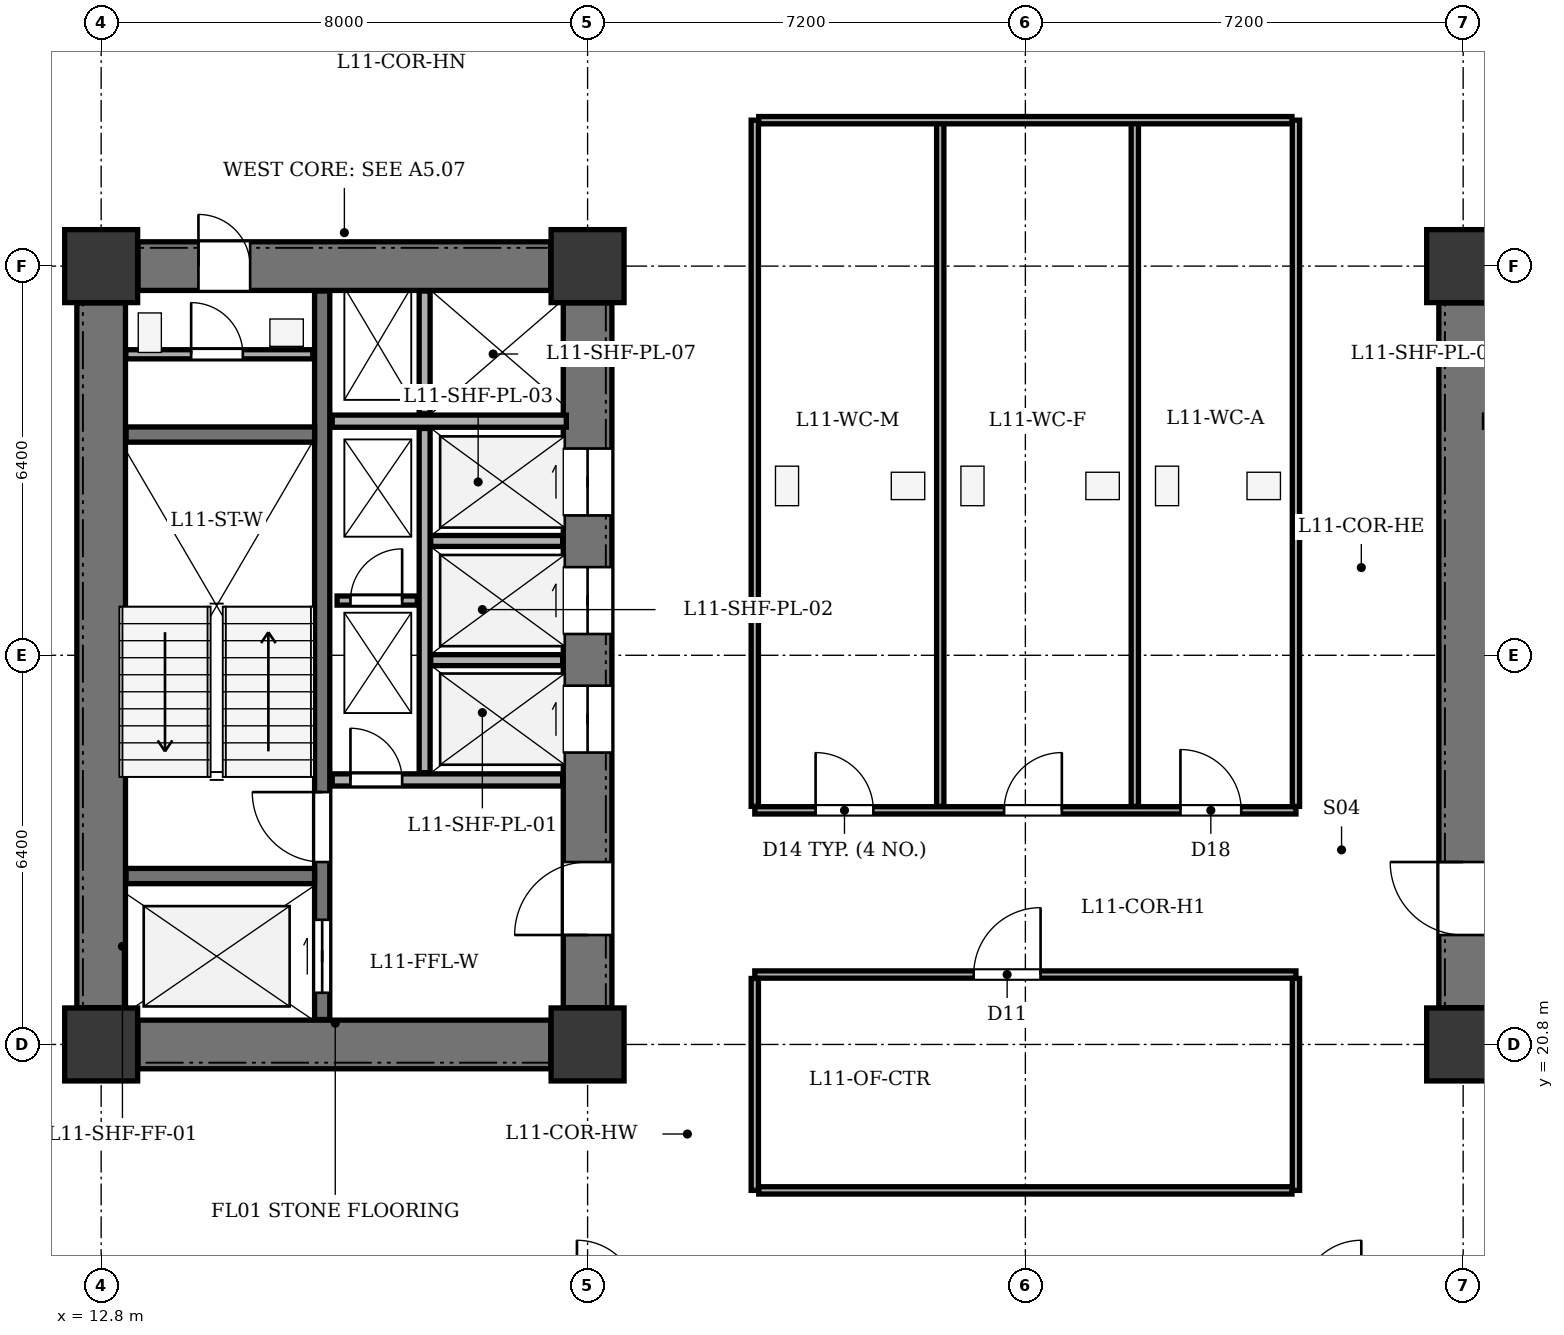
"""IFC4 building model, lengths in metres.
Left out: names, types, materials, properties, quantities, classifications, styles, units other than length and angle.
Written with IfcOpenShell. Run it as: python <this file> out.ifc"""

import sys

from ifc_helpers import new_model, si_unit, direction, frame, frame_2d, origin, origin_2d, place, context, subcontext, project, spatial, rectangle, extrude, element, fill, save


model = new_model("IFC4")
c1 = context("Model", 3, precision=1e-05, world=origin(), true_north=direction((0.0, 1.0)))
c2 = subcontext(c1, "Body", "Model", "MODEL_VIEW")
j1 = project(units=[si_unit("LENGTHUNIT", "METRE"), si_unit("PLANEANGLEUNIT", "RADIAN")], contexts=[c1])
p1 = place(None, origin())
s1 = spatial("IfcSite", under=j1, at=p1, CompositionType="ELEMENT")
p2 = place(p1, origin())
s2 = spatial("IfcBuilding", under=s1, at=p2, CompositionType="ELEMENT")
p3 = place(p2, frame((0.0, 0.0, 47.7)))
s3 = spatial("IfcBuildingStorey", under=s2, at=p3, CompositionType="ELEMENT", Elevation=47.7)
for number, where, z_axis, x_axis in (
    (1, (12.8, 20.8, 0.0), (0.0, 0.0, 1.0), (1.0, 0.0, 0.0)),
    (2, (20.8, 20.8, 0.0), (0.0, 0.0, 1.0), (1.0, 0.0, 0.0)),
    (3, (12.8, 33.6, 0.0), (0.0, 0.0, 1.0), (1.0, 0.0, 0.0)),
    (4, (20.8, 33.6, 0.0), (0.0, 0.0, 1.0), (1.0, 0.0, 0.0)),
    (5, (35.2, 20.8, 0.0), (0.0, 0.0, 1.0), (1.0, 0.0, 0.0)),
    (6, (35.2, 33.6, 0.0), (0.0, 0.0, 1.0), (1.0, 0.0, 0.0)),
):
    element("IfcColumn", number, at=place(p3, frame(where, z_axis=z_axis, x_axis=x_axis)), inside=s3, PredefinedType="COLUMN", context=c2, shape_type="SweptSolid", body=[
        extrude(rectangle(XDim=1.2, YDim=1.2, at=origin_2d()), origin(), (0.0, 0.0, 1.0), 3.9),
    ])
p4 = place(p3, frame((12.8, 21.405, 0.0), z_axis=(0.0, 0.0, 1.0), x_axis=(0.0, 1.0, 0.0)))
e7 = element("IfcWall", 7, at=p4, inside=s3, PredefinedType="SHEAR", context=c2, shape_type="SweptSolid", body=[
    extrude(rectangle(XDim=11.59, YDim=0.8, at=frame_2d((5.795, 0.0))), origin(), (0.0, 0.0, 1.0), 3.6),
])
p5 = place(p3, frame((13.405, 20.8, 0.0), z_axis=(0.0, 0.0, 1.0), x_axis=(1.0, 0.0, 0.0)))
e8 = element("IfcWall", 8, at=p5, inside=s3, PredefinedType="SHEAR", context=c2, shape_type="SweptSolid", body=[
    extrude(rectangle(XDim=6.79, YDim=0.8, at=frame_2d((3.395, 0.0))), origin(), (0.0, 0.0, 1.0), 3.6),
])
p6 = place(p3, frame((13.405, 33.6, 0.0), z_axis=(0.0, 0.0, 1.0), x_axis=(1.0, 0.0, 0.0)))
e9 = element("IfcWall", 9, at=p6, inside=s3, PredefinedType="SHEAR", context=c2, shape_type="SweptSolid", body=[
    extrude(rectangle(XDim=6.79, YDim=0.8, at=frame_2d((3.395, 0.0))), origin(), (0.0, 0.0, 1.0), 3.6),
])
p7 = place(p6, frame((0.995, 0.0, 0.0)))
e10 = element("IfcOpeningElement", 10, at=p7, cuts=e9, PredefinedType="OPENING", context=c2, shape_type="SweptSolid", body=[
    extrude(rectangle(XDim=0.85, YDim=2.02, at=frame_2d((0.425, 1.01))), frame((0.0, 0.41, 0.0), z_axis=(0.0, -1.0, 0.0), x_axis=(1.0, 0.0, 0.0)), (0.0, 0.0, 1.0), 0.82),
])
p8 = place(p3, frame((20.8, 21.405, 0.0), z_axis=(0.0, 0.0, 1.0), x_axis=(0.0, 1.0, 0.0)))
e11 = element("IfcWall", 11, at=p8, inside=s3, PredefinedType="SHEAR", context=c2, shape_type="SweptSolid", body=[
    extrude(rectangle(XDim=11.59, YDim=0.8, at=frame_2d((5.795, 0.0))), origin(), (0.0, 0.0, 1.0), 3.6),
])
p9 = place(p8, frame((1.195, 0.0, 0.0)))
e12 = element("IfcOpeningElement", 12, at=p9, cuts=e11, PredefinedType="OPENING", context=c2, shape_type="SweptSolid", body=[
    extrude(rectangle(XDim=1.2, YDim=2.15, at=frame_2d((0.6, 1.075))), frame((0.0, 0.41, 0.0), z_axis=(0.0, -1.0, 0.0), x_axis=(1.0, 0.0, 0.0)), (0.0, 0.0, 1.0), 0.82),
])
p10 = place(p8, frame((4.195, 0.0, 0.0)))
e13 = element("IfcOpeningElement", 13, at=p10, cuts=e11, PredefinedType="OPENING", context=c2, shape_type="SweptSolid", body=[
    extrude(rectangle(XDim=1.1, YDim=2.1, at=frame_2d((0.55, 1.05))), frame((0.0, 0.41, 0.0), z_axis=(0.0, -1.0, 0.0), x_axis=(1.0, 0.0, 0.0)), (0.0, 0.0, 1.0), 0.82),
])
p11 = place(p8, frame((6.145, 0.0, 0.0)))
e14 = element("IfcOpeningElement", 14, at=p11, cuts=e11, PredefinedType="OPENING", context=c2, shape_type="SweptSolid", body=[
    extrude(rectangle(XDim=1.1, YDim=2.1, at=frame_2d((0.55, 1.05))), frame((0.0, 0.41, 0.0), z_axis=(0.0, -1.0, 0.0), x_axis=(1.0, 0.0, 0.0)), (0.0, 0.0, 1.0), 0.82),
])
p12 = place(p8, frame((8.095, 0.0, 0.0)))
e15 = element("IfcOpeningElement", 15, at=p12, cuts=e11, PredefinedType="OPENING", context=c2, shape_type="SweptSolid", body=[
    extrude(rectangle(XDim=1.1, YDim=2.1, at=frame_2d((0.55, 1.05))), frame((0.0, 0.41, 0.0), z_axis=(0.0, -1.0, 0.0), x_axis=(1.0, 0.0, 0.0)), (0.0, 0.0, 1.0), 0.82),
])
p13 = place(p3, frame((16.435, 21.21, 0.0), z_axis=(0.0, 0.0, 1.0), x_axis=(0.0, 1.0, 0.0)))
e16 = element("IfcWall", 16, at=p13, inside=s3, PredefinedType="SHEAR", context=c2, shape_type="SweptSolid", body=[
    extrude(rectangle(XDim=11.98, YDim=0.25, at=frame_2d((5.99, 0.0))), origin(), (0.0, 0.0, 1.0), 3.6),
])
p14 = place(p13, frame((0.44, 0.0, 0.0)))
e17 = element("IfcOpeningElement", 17, at=p14, cuts=e16, PredefinedType="OPENING", context=c2, shape_type="SweptSolid", body=[
    extrude(rectangle(XDim=1.2, YDim=2.15, at=frame_2d((0.6, 1.075))), frame((0.0, 0.135, 0.0), z_axis=(0.0, -1.0, 0.0), x_axis=(1.0, 0.0, 0.0)), (0.0, 0.0, 1.0), 0.27),
])
p15 = place(p13, frame((2.59, 0.0, 0.0)))
e18 = element("IfcOpeningElement", 18, at=p15, cuts=e16, PredefinedType="OPENING", context=c2, shape_type="SweptSolid", body=[
    extrude(rectangle(XDim=1.15, YDim=2.15, at=frame_2d((0.575, 1.075))), frame((0.0, 0.135, 0.0), z_axis=(0.0, -1.0, 0.0), x_axis=(1.0, 0.0, 0.0)), (0.0, 0.0, 1.0), 0.27),
])
for number, where, z_axis, x_axis in (
    (19, (13.21, 23.57, 0.0), (0.0, 0.0, 1.0), (1.0, 0.0, 0.0)),
    (20, (13.21, 30.83, 0.0), (0.0, 0.0, 1.0), (1.0, 0.0, 0.0)),
):
    element("IfcWall", number, at=place(p3, frame(where, z_axis=z_axis, x_axis=x_axis)), inside=s3, PredefinedType="SHEAR", context=c2, shape_type="SweptSolid", body=[
        extrude(rectangle(XDim=3.1, YDim=0.25, at=frame_2d((1.55, 0.0))), origin(), (0.0, 0.0, 1.0), 3.6),
    ])
p16 = place(p3, frame((16.6, 25.15, 0.0), z_axis=(0.0, 0.0, 1.0), x_axis=(1.0, 0.0, 0.0)))
e21 = element("IfcWall", 21, at=p16, inside=s3, PredefinedType="SOLIDWALL", context=c2, shape_type="SweptSolid", body=[
    extrude(rectangle(XDim=3.79, YDim=0.2, at=frame_2d((1.895, 0.0))), origin(), (0.0, 0.0, 1.0), 3.6),
])
p17 = place(p16, frame((0.3, 0.0, 0.0)))
e22 = element("IfcOpeningElement", 22, at=p17, cuts=e21, PredefinedType="OPENING", context=c2, shape_type="SweptSolid", body=[
    extrude(rectangle(XDim=0.85, YDim=2.02, at=frame_2d((0.425, 1.01))), frame((0.0, 0.11, 0.0), z_axis=(0.0, -1.0, 0.0), x_axis=(1.0, 0.0, 0.0)), (0.0, 0.0, 1.0), 0.22),
])
p18 = place(p3, frame((16.6, 31.05, 0.0), z_axis=(0.0, 0.0, 1.0), x_axis=(1.0, 0.0, 0.0)))
e23 = element("IfcWall", 23, at=p18, inside=s3, PredefinedType="SOLIDWALL", context=c2, shape_type="SweptSolid", body=[
    extrude(rectangle(XDim=3.85, YDim=0.2, at=frame_2d((1.925, 0.0))), origin(), (0.0, 0.0, 1.0), 3.6),
])
p19 = place(p3, frame((18.12, 25.27, 0.0), z_axis=(0.0, 0.0, 1.0), x_axis=(0.0, 1.0, 0.0)))
e24 = element("IfcWall", 24, at=p19, inside=s3, PredefinedType="PARTITIONING", context=c2, shape_type="SweptSolid", body=[
    extrude(rectangle(XDim=5.66, YDim=0.18, at=frame_2d((2.83, 0.0))), origin(), (0.0, 0.0, 1.0), 3.6),
])
p20 = place(p3, frame((18.12, 31.17, 0.0), z_axis=(0.0, 0.0, 1.0), x_axis=(0.0, 1.0, 0.0)))
e25 = element("IfcWall", 25, at=p20, inside=s3, PredefinedType="PARTITIONING", context=c2, shape_type="SweptSolid", body=[
    extrude(rectangle(XDim=2.02, YDim=0.18, at=frame_2d((1.01, 0.0))), origin(), (0.0, 0.0, 1.0), 3.6),
])
for number, where, z_axis, x_axis in (
    (26, (18.22, 27.12, 0.0), (0.0, 0.0, 1.0), (1.0, 0.0, 0.0)),
    (27, (18.22, 29.08, 0.0), (0.0, 0.0, 1.0), (1.0, 0.0, 0.0)),
):
    element("IfcWall", number, at=place(p3, frame(where, z_axis=z_axis, x_axis=x_axis)), inside=s3, PredefinedType="PARTITIONING", context=c2, shape_type="SweptSolid", body=[
        extrude(rectangle(XDim=2.17, YDim=0.18, at=frame_2d((1.085, 0.0))), origin(), (0.0, 0.0, 1.0), 3.6),
    ])
p21 = place(p3, frame((35.2, 21.405, 0.0), z_axis=(0.0, 0.0, 1.0), x_axis=(0.0, 1.0, 0.0)))
e28 = element("IfcWall", 28, at=p21, inside=s3, PredefinedType="SHEAR", context=c2, shape_type="SweptSolid", body=[
    extrude(rectangle(XDim=11.59, YDim=0.8, at=frame_2d((5.795, 0.0))), origin(), (0.0, 0.0, 1.0), 3.6),
])
p22 = place(p21, frame((1.195, 0.0, 0.0)))
e29 = element("IfcOpeningElement", 29, at=p22, cuts=e28, PredefinedType="OPENING", context=c2, shape_type="SweptSolid", body=[
    extrude(rectangle(XDim=1.2, YDim=2.15, at=frame_2d((0.6, 1.075))), frame((0.0, 0.41, 0.0), z_axis=(0.0, -1.0, 0.0), x_axis=(1.0, 0.0, 0.0)), (0.0, 0.0, 1.0), 0.82),
])
p23 = place(p3, frame((13.205, 32.15, 0.0), z_axis=(0.0, 0.0, 1.0), x_axis=(1.0, 0.0, 0.0)))
e30 = element("IfcWall", 30, at=p23, inside=s3, PredefinedType="PARTITIONING", context=c2, shape_type="SweptSolid", body=[
    extrude(rectangle(XDim=3.075, YDim=0.15, at=frame_2d((1.538, 0.0))), origin(), (0.0, 0.0, 1.0), 3.6),
])
p24 = place(p23, frame((1.075, 0.0, 0.0)))
e31 = element("IfcOpeningElement", 31, at=p24, cuts=e30, PredefinedType="OPENING", context=c2, shape_type="SweptSolid", body=[
    extrude(rectangle(XDim=0.85, YDim=2.02, at=frame_2d((0.425, 1.01))), frame((0.0, 0.085, 0.0), z_axis=(0.0, -1.0, 0.0), x_axis=(1.0, 0.0, 0.0)), (0.0, 0.0, 1.0), 0.17),
])
p25 = place(p3, frame((16.68, 28.1, 0.0), z_axis=(0.0, 0.0, 1.0), x_axis=(1.0, 0.0, 0.0)))
e32 = element("IfcWall", 32, at=p25, inside=s3, PredefinedType="PARTITIONING", context=c2, shape_type="SweptSolid", body=[
    extrude(rectangle(XDim=1.32, YDim=0.15, at=frame_2d((0.66, 0.0))), origin(), (0.0, 0.0, 1.0), 3.6),
])
p26 = place(p25, frame((0.22, 0.0, 0.0)))
e33 = element("IfcOpeningElement", 33, at=p26, cuts=e32, PredefinedType="OPENING", context=c2, shape_type="SweptSolid", body=[
    extrude(rectangle(XDim=0.85, YDim=2.02, at=frame_2d((0.425, 1.01))), frame((0.0, 0.085, 0.0), z_axis=(0.0, -1.0, 0.0), x_axis=(1.0, 0.0, 0.0)), (0.0, 0.0, 1.0), 0.17),
])
p27 = place(p3, frame((23.55, 24.65, 0.0), z_axis=(0.0, 0.0, 1.0), x_axis=(1.0, 0.0, 0.0)))
e34 = element("IfcWall", 34, at=p27, inside=s3, PredefinedType="PARTITIONING", context=c2, shape_type="SweptSolid", body=[
    extrude(rectangle(XDim=8.9, YDim=0.12, at=frame_2d((4.45, 0.0))), origin(), (0.0, 0.0, 1.0), 3.135),
])
p28 = place(p27, frame((1.0, 0.0, 0.0)))
e35 = element("IfcOpeningElement", 35, at=p28, cuts=e34, PredefinedType="OPENING", context=c2, shape_type="SweptSolid", body=[
    extrude(rectangle(XDim=0.95, YDim=2.1, at=frame_2d((0.475, 1.05))), frame((0.0, 0.07, 0.0), z_axis=(0.0, -1.0, 0.0), x_axis=(1.0, 0.0, 0.0)), (0.0, 0.0, 1.0), 0.14),
])
p29 = place(p27, frame((4.1, 0.0, 0.0)))
e36 = element("IfcOpeningElement", 36, at=p29, cuts=e34, PredefinedType="OPENING", context=c2, shape_type="SweptSolid", body=[
    extrude(rectangle(XDim=0.95, YDim=2.1, at=frame_2d((0.475, 1.05))), frame((0.0, 0.07, 0.0), z_axis=(0.0, -1.0, 0.0), x_axis=(1.0, 0.0, 0.0)), (0.0, 0.0, 1.0), 0.14),
])
p30 = place(p27, frame((7.0, 0.0, 0.0)))
e37 = element("IfcOpeningElement", 37, at=p30, cuts=e34, PredefinedType="OPENING", context=c2, shape_type="SweptSolid", body=[
    extrude(rectangle(XDim=1.0, YDim=2.1, at=frame_2d((0.5, 1.05))), frame((0.0, 0.07, 0.0), z_axis=(0.0, -1.0, 0.0), x_axis=(1.0, 0.0, 0.0)), (0.0, 0.0, 1.0), 0.14),
])
for number, where, z_axis, x_axis in (
    (38, (23.55, 24.715, 0.0), (0.0, 0.0, 1.0), (0.0, 1.0, 0.0)),
    (39, (32.45, 24.715, 0.0), (0.0, 0.0, 1.0), (0.0, 1.0, 0.0)),
    (40, (26.6, 24.715, 0.0), (0.0, 0.0, 1.0), (0.0, 1.0, 0.0)),
):
    element("IfcWall", number, at=place(p3, frame(where, z_axis=z_axis, x_axis=x_axis)), inside=s3, PredefinedType="PARTITIONING", context=c2, shape_type="SweptSolid", body=[
        extrude(rectangle(XDim=11.285, YDim=0.12, at=frame_2d((5.643, 0.0))), origin(), (0.0, 0.0, 1.0), 3.6),
    ])
p31 = place(p3, frame((29.8, 24.715, 0.0), z_axis=(0.0, 0.0, 1.0), x_axis=(0.0, 1.0, 0.0)))
e41 = element("IfcWall", 41, at=p31, inside=s3, PredefinedType="PARTITIONING", context=c2, shape_type="SweptSolid", body=[
    extrude(rectangle(XDim=11.285, YDim=0.12, at=frame_2d((5.643, 0.0))), origin(), (0.0, 0.0, 1.0), 3.135),
])
p32 = place(p3, frame((23.615, 36.0, 0.0), z_axis=(0.0, 0.0, 1.0), x_axis=(1.0, 0.0, 0.0)))
e42 = element("IfcWall", 42, at=p32, inside=s3, PredefinedType="PARTITIONING", context=c2, shape_type="SweptSolid", body=[
    extrude(rectangle(XDim=8.77, YDim=0.12, at=frame_2d((4.385, 0.0))), origin(), (0.0, 0.0, 1.0), 3.6),
])
p33 = place(p3, frame((23.55, 21.95, 0.0), z_axis=(0.0, 0.0, 1.0), x_axis=(1.0, 0.0, 0.0)))
e43 = element("IfcWall", 43, at=p33, inside=s3, PredefinedType="PARTITIONING", context=c2, shape_type="SweptSolid", body=[
    extrude(rectangle(XDim=8.9, YDim=0.12, at=frame_2d((4.45, 0.0))), origin(), (0.0, 0.0, 1.0), 3.135),
])
p34 = place(p33, frame((3.6, 0.0, 0.0)))
e44 = element("IfcOpeningElement", 44, at=p34, cuts=e43, PredefinedType="OPENING", context=c2, shape_type="SweptSolid", body=[
    extrude(rectangle(XDim=1.1, YDim=2.15, at=frame_2d((0.55, 1.075))), frame((0.0, 0.07, 0.0), z_axis=(0.0, -1.0, 0.0), x_axis=(1.0, 0.0, 0.0)), (0.0, 0.0, 1.0), 0.14),
])
for number, where, z_axis, x_axis in (
    (45, (23.55, 18.4, 0.0), (0.0, 0.0, 1.0), (0.0, 1.0, 0.0)),
    (46, (32.45, 18.4, 0.0), (0.0, 0.0, 1.0), (0.0, 1.0, 0.0)),
):
    element("IfcWall", number, at=place(p3, frame(where, z_axis=z_axis, x_axis=x_axis)), inside=s3, PredefinedType="PARTITIONING", context=c2, shape_type="SweptSolid", body=[
        extrude(rectangle(XDim=3.485, YDim=0.12, at=frame_2d((1.743, 0.0))), origin(), (0.0, 0.0, 1.0), 3.6),
    ])
p35 = place(p3, frame((23.615, 18.4, 0.0), z_axis=(0.0, 0.0, 1.0), x_axis=(1.0, 0.0, 0.0)))
e47 = element("IfcWall", 47, at=p35, inside=s3, PredefinedType="PARTITIONING", context=c2, shape_type="SweptSolid", body=[
    extrude(rectangle(XDim=8.77, YDim=0.12, at=frame_2d((4.385, 0.0))), origin(), (0.0, 0.0, 1.0), 3.6),
])
p36 = place(p7, origin())
e48 = element("IfcDoor", 48, at=p36, inside=s3, OperationType="SINGLE_SWING_LEFT", PredefinedType="DOOR", context=c2, shape_type="SweptSolid", body=[
    extrude(rectangle(XDim=0.85, YDim=2.02, at=frame_2d((0.425, 1.01))), frame((0.0, 0.025, 0.0), z_axis=(0.0, -1.0, 0.0), x_axis=(1.0, 0.0, 0.0)), (0.0, 0.0, 1.0), 0.05),
])
fill(e10, e48)
p37 = place(p9, origin())
e49 = element("IfcDoor", 49, at=p37, inside=s3, OperationType="SINGLE_SWING_LEFT", PredefinedType="DOOR", context=c2, shape_type="SweptSolid", body=[
    extrude(rectangle(XDim=1.2, YDim=2.15, at=frame_2d((0.6, 1.075))), frame((0.0, 0.025, 0.0), z_axis=(0.0, -1.0, 0.0), x_axis=(1.0, 0.0, 0.0)), (0.0, 0.0, 1.0), 0.05),
])
fill(e12, e49)
p38 = place(p10, origin())
e50 = element("IfcDoor", 50, at=p38, inside=s3, OperationType="DOUBLE_DOOR_SLIDING", PredefinedType="DOOR", context=c2, shape_type="SweptSolid", body=[
    extrude(rectangle(XDim=1.1, YDim=2.1, at=frame_2d((0.55, 1.05))), frame((0.0, 0.025, 0.0), z_axis=(0.0, -1.0, 0.0), x_axis=(1.0, 0.0, 0.0)), (0.0, 0.0, 1.0), 0.05),
])
fill(e13, e50)
p39 = place(p11, origin())
e51 = element("IfcDoor", 51, at=p39, inside=s3, OperationType="DOUBLE_DOOR_SLIDING", PredefinedType="DOOR", context=c2, shape_type="SweptSolid", body=[
    extrude(rectangle(XDim=1.1, YDim=2.1, at=frame_2d((0.55, 1.05))), frame((0.0, 0.025, 0.0), z_axis=(0.0, -1.0, 0.0), x_axis=(1.0, 0.0, 0.0)), (0.0, 0.0, 1.0), 0.05),
])
fill(e14, e51)
p40 = place(p12, origin())
e52 = element("IfcDoor", 52, at=p40, inside=s3, OperationType="DOUBLE_DOOR_SLIDING", PredefinedType="DOOR", context=c2, shape_type="SweptSolid", body=[
    extrude(rectangle(XDim=1.1, YDim=2.1, at=frame_2d((0.55, 1.05))), frame((0.0, 0.025, 0.0), z_axis=(0.0, -1.0, 0.0), x_axis=(1.0, 0.0, 0.0)), (0.0, 0.0, 1.0), 0.05),
])
fill(e15, e52)
p41 = place(p14, origin())
e53 = element("IfcDoor", 53, at=p41, inside=s3, OperationType="DOUBLE_DOOR_SLIDING", PredefinedType="DOOR", context=c2, shape_type="SweptSolid", body=[
    extrude(rectangle(XDim=1.2, YDim=2.15, at=frame_2d((0.6, 1.075))), frame((0.0, 0.025, 0.0), z_axis=(0.0, -1.0, 0.0), x_axis=(1.0, 0.0, 0.0)), (0.0, 0.0, 1.0), 0.05),
])
fill(e17, e53)
p42 = place(p15, origin())
e54 = element("IfcDoor", 54, at=p42, inside=s3, OperationType="SINGLE_SWING_RIGHT", PredefinedType="DOOR", context=c2, shape_type="SweptSolid", body=[
    extrude(rectangle(XDim=1.15, YDim=2.15, at=frame_2d((0.575, 1.075))), frame((0.0, 0.025, 0.0), z_axis=(0.0, -1.0, 0.0), x_axis=(1.0, 0.0, 0.0)), (0.0, 0.0, 1.0), 0.05),
])
fill(e18, e54)
p43 = place(p17, origin())
e55 = element("IfcDoor", 55, at=p43, inside=s3, OperationType="SINGLE_SWING_LEFT", PredefinedType="DOOR", context=c2, shape_type="SweptSolid", body=[
    extrude(rectangle(XDim=0.85, YDim=2.02, at=frame_2d((0.425, 1.01))), frame((0.0, 0.025, 0.0), z_axis=(0.0, -1.0, 0.0), x_axis=(1.0, 0.0, 0.0)), (0.0, 0.0, 1.0), 0.05),
])
fill(e22, e55)
p44 = place(p22, origin())
e56 = element("IfcDoor", 56, at=p44, inside=s3, OperationType="SINGLE_SWING_RIGHT", PredefinedType="DOOR", context=c2, shape_type="SweptSolid", body=[
    extrude(rectangle(XDim=1.2, YDim=2.15, at=frame_2d((0.6, 1.075))), frame((0.0, 0.025, 0.0), z_axis=(0.0, -1.0, 0.0), x_axis=(1.0, 0.0, 0.0)), (0.0, 0.0, 1.0), 0.05),
])
fill(e29, e56)
p45 = place(p24, origin())
e57 = element("IfcDoor", 57, at=p45, inside=s3, OperationType="SINGLE_SWING_LEFT", PredefinedType="DOOR", context=c2, shape_type="SweptSolid", body=[
    extrude(rectangle(XDim=0.85, YDim=2.02, at=frame_2d((0.425, 1.01))), frame((0.0, 0.025, 0.0), z_axis=(0.0, -1.0, 0.0), x_axis=(1.0, 0.0, 0.0)), (0.0, 0.0, 1.0), 0.05),
])
fill(e31, e57)
p46 = place(p26, origin())
e58 = element("IfcDoor", 58, at=p46, inside=s3, OperationType="SINGLE_SWING_RIGHT", PredefinedType="DOOR", context=c2, shape_type="SweptSolid", body=[
    extrude(rectangle(XDim=0.85, YDim=2.02, at=frame_2d((0.425, 1.01))), frame((0.0, 0.025, 0.0), z_axis=(0.0, -1.0, 0.0), x_axis=(1.0, 0.0, 0.0)), (0.0, 0.0, 1.0), 0.05),
])
fill(e33, e58)
p47 = place(p28, origin())
e59 = element("IfcDoor", 59, at=p47, inside=s3, OperationType="SINGLE_SWING_LEFT", PredefinedType="DOOR", context=c2, shape_type="SweptSolid", body=[
    extrude(rectangle(XDim=0.95, YDim=2.1, at=frame_2d((0.475, 1.05))), frame((0.0, 0.025, 0.0), z_axis=(0.0, -1.0, 0.0), x_axis=(1.0, 0.0, 0.0)), (0.0, 0.0, 1.0), 0.05),
])
fill(e35, e59)
p48 = place(p29, origin())
e60 = element("IfcDoor", 60, at=p48, inside=s3, OperationType="SINGLE_SWING_RIGHT", PredefinedType="DOOR", context=c2, shape_type="SweptSolid", body=[
    extrude(rectangle(XDim=0.95, YDim=2.1, at=frame_2d((0.475, 1.05))), frame((0.0, 0.025, 0.0), z_axis=(0.0, -1.0, 0.0), x_axis=(1.0, 0.0, 0.0)), (0.0, 0.0, 1.0), 0.05),
])
fill(e36, e60)
p49 = place(p30, origin())
e61 = element("IfcDoor", 61, at=p49, inside=s3, OperationType="SINGLE_SWING_LEFT", PredefinedType="DOOR", context=c2, shape_type="SweptSolid", body=[
    extrude(rectangle(XDim=1.0, YDim=2.1, at=frame_2d((0.5, 1.05))), frame((0.0, 0.025, 0.0), z_axis=(0.0, -1.0, 0.0), x_axis=(1.0, 0.0, 0.0)), (0.0, 0.0, 1.0), 0.05),
])
fill(e37, e61)
p50 = place(p34, origin())
e62 = element("IfcDoor", 62, at=p50, inside=s3, OperationType="SINGLE_SWING_RIGHT", PredefinedType="DOOR", context=c2, shape_type="SweptSolid", body=[
    extrude(rectangle(XDim=1.1, YDim=2.15, at=frame_2d((0.55, 1.075))), frame((0.0, 0.025, 0.0), z_axis=(0.0, -1.0, 0.0), x_axis=(1.0, 0.0, 0.0)), (0.0, 0.0, 1.0), 0.05),
])
fill(e44, e62)
save(model, sys.argv[1])
